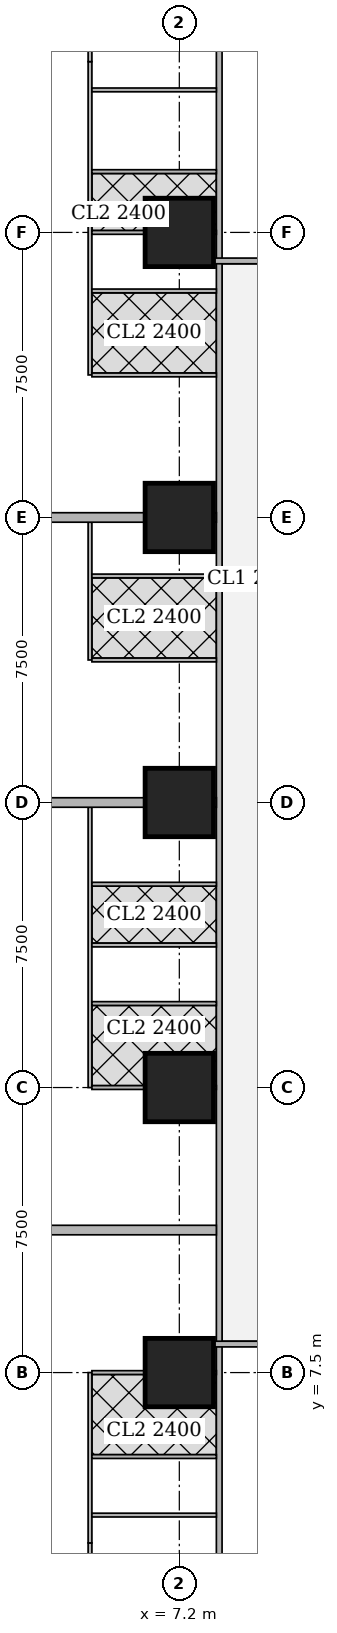
"""IFC4 building model, lengths in metres.
Left out: names, types, materials, properties, quantities, classifications, styles, units other than length and angle.
Written with IfcOpenShell. Run it as: python <this file> out.ifc"""

import sys

from ifc_helpers import new_model, si_unit, direction, frame, frame_2d, origin, origin_2d, place, context, subcontext, project, spatial, rectangle, extrude, element, fill, save


model = new_model("IFC4")
c1 = context("Model", 3, precision=1e-05, world=origin(), true_north=direction((0.0, 1.0)))
c2 = subcontext(c1, "Body", "Model", "MODEL_VIEW")
j1 = project(units=[si_unit("LENGTHUNIT", "METRE"), si_unit("PLANEANGLEUNIT", "RADIAN")], contexts=[c1])
p1 = place(None, origin())
s1 = spatial("IfcSite", under=j1, at=p1, CompositionType="ELEMENT")
p2 = place(p1, origin())
s2 = spatial("IfcBuilding", under=s1, at=p2, CompositionType="ELEMENT")
p3 = place(p2, frame((0.0, 0.0, 53.75)))
s3 = spatial("IfcBuildingStorey", under=s2, at=p3, CompositionType="ELEMENT", Elevation=53.75)
for number, where, z_axis, x_axis in (
    (1, (7.2, 7.5, 0.0), (0.0, 0.0, 1.0), (1.0, 0.0, 0.0)),
    (2, (7.2, 15.0, 0.0), (0.0, 0.0, 1.0), (1.0, 0.0, 0.0)),
    (3, (7.2, 22.5, 0.0), (0.0, 0.0, 1.0), (1.0, 0.0, 0.0)),
    (4, (7.2, 30.0, 0.0), (0.0, 0.0, 1.0), (1.0, 0.0, 0.0)),
    (5, (7.2, 37.5, 0.0), (0.0, 0.0, 1.0), (1.0, 0.0, 0.0)),
):
    element("IfcColumn", number, at=place(p3, frame(where, z_axis=z_axis, x_axis=x_axis)), inside=s3, PredefinedType="COLUMN", context=c2, shape_type="SweptSolid", body=[
        extrude(rectangle(XDim=1.8, YDim=1.8, at=origin_2d()), origin(), (0.0, 0.0, 1.0), 3.75),
    ])
p4 = place(p3, frame((8.25, 2.426, 0.0), z_axis=(0.0, 0.0, 1.0), x_axis=(0.0, 1.0, 0.0)))
e6 = element("IfcWall", 6, at=p4, inside=s3, PredefinedType="SOLIDWALL", context=c2, shape_type="SweptSolid", body=[
    extrude(rectangle(XDim=40.173, YDim=0.15, at=frame_2d((20.086, 0.0))), origin(), (0.0, 0.0, 1.0), 3.5),
])
p5 = place(p4, frame((6.661, 0.0, 0.0)))
e7 = element("IfcOpeningElement", 7, at=p5, cuts=e6, PredefinedType="OPENING", context=c2, shape_type="SweptSolid", body=[
    extrude(rectangle(XDim=1.0, YDim=2.1, at=frame_2d((0.5, 1.05))), frame((0.0, 0.085, 0.0), z_axis=(0.0, -1.0, 0.0), x_axis=(1.0, 0.0, 0.0)), (0.0, 0.0, 1.0), 0.17),
])
p6 = place(p4, frame((9.986, 0.0, 0.0)))
e8 = element("IfcOpeningElement", 8, at=p6, cuts=e6, PredefinedType="OPENING", context=c2, shape_type="SweptSolid", body=[
    extrude(rectangle(XDim=1.0, YDim=2.1, at=frame_2d((0.5, 1.05))), frame((0.0, 0.085, 0.0), z_axis=(0.0, -1.0, 0.0), x_axis=(1.0, 0.0, 0.0)), (0.0, 0.0, 1.0), 0.17),
])
p7 = place(p4, frame((21.662, 0.0, 0.0)))
e9 = element("IfcOpeningElement", 9, at=p7, cuts=e6, PredefinedType="OPENING", context=c2, shape_type="SweptSolid", body=[
    extrude(rectangle(XDim=1.0, YDim=2.1, at=frame_2d((0.5, 1.05))), frame((0.0, 0.085, 0.0), z_axis=(0.0, -1.0, 0.0), x_axis=(1.0, 0.0, 0.0)), (0.0, 0.0, 1.0), 0.17),
])
p8 = place(p4, frame((29.161, 0.0, 0.0)))
e10 = element("IfcOpeningElement", 10, at=p8, cuts=e6, PredefinedType="OPENING", context=c2, shape_type="SweptSolid", body=[
    extrude(rectangle(XDim=1.0, YDim=2.1, at=frame_2d((0.5, 1.05))), frame((0.0, 0.085, 0.0), z_axis=(0.0, -1.0, 0.0), x_axis=(1.0, 0.0, 0.0)), (0.0, 0.0, 1.0), 0.17),
])
p9 = place(p3, frame((13.499, 8.25, 0.0), z_axis=(0.0, 0.0, 1.0), x_axis=(-1.0, 0.0, 0.0)))
e11 = element("IfcWall", 11, at=p9, inside=s3, PredefinedType="SOLIDWALL", context=c2, shape_type="SweptSolid", body=[
    extrude(rectangle(XDim=5.399, YDim=0.15, at=frame_2d((2.699, 0.0))), origin(), (0.0, 0.0, 1.0), 3.5),
])
p10 = place(p9, frame((1.674, 0.0, 0.0)))
e12 = element("IfcOpeningElement", 12, at=p10, cuts=e11, PredefinedType="OPENING", context=c2, shape_type="SweptSolid", body=[
    extrude(rectangle(XDim=1.0, YDim=2.1, at=frame_2d((0.5, 1.05))), frame((0.0, 0.085, 0.0), z_axis=(0.0, -1.0, 0.0), x_axis=(1.0, 0.0, 0.0)), (0.0, 0.0, 1.0), 0.17),
])
p11 = place(p3, frame((8.1, 36.75, 0.0), z_axis=(0.0, 0.0, 1.0), x_axis=(1.0, 0.0, 0.0)))
e13 = element("IfcWall", 13, at=p11, inside=s3, PredefinedType="SOLIDWALL", context=c2, shape_type="SweptSolid", body=[
    extrude(rectangle(XDim=5.399, YDim=0.15, at=frame_2d((2.699, 0.0))), origin(), (0.0, 0.0, 1.0), 3.5),
])
p12 = place(p11, frame((2.725, 0.0, 0.0)))
e14 = element("IfcOpeningElement", 14, at=p12, cuts=e13, PredefinedType="OPENING", context=c2, shape_type="SweptSolid", body=[
    extrude(rectangle(XDim=1.0, YDim=2.1, at=frame_2d((0.5, 1.05))), frame((0.0, 0.085, 0.0), z_axis=(0.0, -1.0, 0.0), x_axis=(1.0, 0.0, 0.0)), (0.0, 0.0, 1.0), 0.17),
])
p13 = place(p3, frame((4.85, 0.121, 0.0), z_axis=(0.0, 0.0, 1.0), x_axis=(0.0, 1.0, 0.0)))
e15 = element("IfcWall", 15, at=p13, inside=s3, PredefinedType="PARTITIONING", context=c2, shape_type="SweptSolid", body=[
    extrude(rectangle(XDim=2.897, YDim=0.1, at=frame_2d((1.448, 0.0))), origin(), (0.0, 0.0, 1.0), 2.05),
])
p14 = place(p3, frame((4.85, 3.018, 0.0), z_axis=(0.0, 0.0, 1.0), x_axis=(0.0, 1.0, 0.0)))
e16 = element("IfcWall", 16, at=p14, inside=s3, PredefinedType="PARTITIONING", context=c2, shape_type="SweptSolid", body=[
    extrude(rectangle(XDim=4.482, YDim=0.1, at=frame_2d((2.241, 0.0))), origin(), (0.0, 0.0, 1.0), 3.5),
])
p15 = place(p14, frame((2.927, 0.0, 0.0)))
e17 = element("IfcOpeningElement", 17, at=p15, cuts=e16, PredefinedType="OPENING", context=c2, shape_type="SweptSolid", body=[
    extrude(rectangle(XDim=0.9, YDim=2.1, at=frame_2d((0.45, 1.05))), frame((0.0, 0.06, 0.0), z_axis=(0.0, -1.0, 0.0), x_axis=(1.0, 0.0, 0.0)), (0.0, 0.0, 1.0), 0.12),
])
p16 = place(p14, frame((1.052, 0.0, 0.0)))
e18 = element("IfcOpeningElement", 18, at=p16, cuts=e16, PredefinedType="OPENING", context=c2, shape_type="SweptSolid", body=[
    extrude(rectangle(XDim=0.9, YDim=2.1, at=frame_2d((0.45, 1.05))), frame((0.0, 0.06, 0.0), z_axis=(0.0, -1.0, 0.0), x_axis=(1.0, 0.0, 0.0)), (0.0, 0.0, 1.0), 0.12),
])
p17 = place(p3, frame((4.9, 3.75, 0.0), z_axis=(0.0, 0.0, 1.0), x_axis=(1.0, 0.0, 0.0)))
e19 = element("IfcWall", 19, at=p17, inside=s3, PredefinedType="PARTITIONING", context=c2, shape_type="SweptSolid", body=[
    extrude(rectangle(XDim=3.275, YDim=0.1, at=frame_2d((1.638, 0.0))), origin(), (0.0, 0.0, 1.0), 3.5),
])
p18 = place(p3, frame((4.9, 7.5, 0.0), z_axis=(0.0, 0.0, 1.0), x_axis=(1.0, 0.0, 0.0)))
e20 = element("IfcWall", 20, at=p18, inside=s3, PredefinedType="PARTITIONING", context=c2, shape_type="SweptSolid", body=[
    extrude(rectangle(XDim=1.399, YDim=0.1, at=frame_2d((0.7, 0.0))), origin(), (0.0, 0.0, 1.0), 3.5),
])
p19 = place(p3, frame((8.101, 7.5, 0.0), z_axis=(0.0, 0.0, 1.0), x_axis=(1.0, 0.0, 0.0)))
e21 = element("IfcWall", 21, at=p19, inside=s3, PredefinedType="PARTITIONING", context=c2, shape_type="SweptSolid", body=[
    extrude(rectangle(XDim=0.074, YDim=0.1, at=frame_2d((0.037, 0.0))), origin(), (0.0, 0.0, 1.0), 3.5),
])
p20 = place(p3, frame((4.9, 5.29, 0.0), z_axis=(0.0, 0.0, 1.0), x_axis=(1.0, 0.0, 0.0)))
e22 = element("IfcWall", 22, at=p20, inside=s3, PredefinedType="PARTITIONING", context=c2, shape_type="SweptSolid", body=[
    extrude(rectangle(XDim=3.275, YDim=0.1, at=frame_2d((1.638, 0.0))), origin(), (0.0, 0.0, 1.0), 3.5),
])
p21 = place(p3, frame((4.85, 15.0, 0.0), z_axis=(0.0, 0.0, 1.0), x_axis=(0.0, 1.0, 0.0)))
e23 = element("IfcWall", 23, at=p21, inside=s3, PredefinedType="PARTITIONING", context=c2, shape_type="SweptSolid", body=[
    extrude(rectangle(XDim=7.375, YDim=0.1, at=frame_2d((3.688, 0.0))), origin(), (0.0, 0.0, 1.0), 3.5),
])
p22 = place(p21, frame((0.655, 0.0, 0.0)))
e24 = element("IfcOpeningElement", 24, at=p22, cuts=e23, PredefinedType="OPENING", context=c2, shape_type="SweptSolid", body=[
    extrude(rectangle(XDim=0.9, YDim=2.1, at=frame_2d((0.45, 1.05))), frame((0.0, 0.06, 0.0), z_axis=(0.0, -1.0, 0.0), x_axis=(1.0, 0.0, 0.0)), (0.0, 0.0, 1.0), 0.12),
])
p23 = place(p21, frame((4.1, 0.0, 0.0)))
e25 = element("IfcOpeningElement", 25, at=p23, cuts=e23, PredefinedType="OPENING", context=c2, shape_type="SweptSolid", body=[
    extrude(rectangle(XDim=0.9, YDim=2.1, at=frame_2d((0.45, 1.05))), frame((0.0, 0.06, 0.0), z_axis=(0.0, -1.0, 0.0), x_axis=(1.0, 0.0, 0.0)), (0.0, 0.0, 1.0), 0.12),
])
p24 = place(p21, frame((2.53, 0.0, 0.0)))
e26 = element("IfcOpeningElement", 26, at=p24, cuts=e23, PredefinedType="OPENING", context=c2, shape_type="SweptSolid", body=[
    extrude(rectangle(XDim=0.9, YDim=2.1, at=frame_2d((0.45, 1.05))), frame((0.0, 0.06, 0.0), z_axis=(0.0, -1.0, 0.0), x_axis=(1.0, 0.0, 0.0)), (0.0, 0.0, 1.0), 0.12),
])
p25 = place(p21, frame((5.975, 0.0, 0.0)))
e27 = element("IfcOpeningElement", 27, at=p25, cuts=e23, PredefinedType="OPENING", context=c2, shape_type="SweptSolid", body=[
    extrude(rectangle(XDim=0.9, YDim=2.1, at=frame_2d((0.45, 1.05))), frame((0.0, 0.06, 0.0), z_axis=(0.0, -1.0, 0.0), x_axis=(1.0, 0.0, 0.0)), (0.0, 0.0, 1.0), 0.12),
])
p26 = place(p3, frame((4.9, 15.0, 0.0), z_axis=(0.0, 0.0, 1.0), x_axis=(1.0, 0.0, 0.0)))
e28 = element("IfcWall", 28, at=p26, inside=s3, PredefinedType="PARTITIONING", context=c2, shape_type="SweptSolid", body=[
    extrude(rectangle(XDim=1.399, YDim=0.1, at=frame_2d((0.7, 0.0))), origin(), (0.0, 0.0, 1.0), 3.5),
])
p27 = place(p3, frame((8.101, 15.0, 0.0), z_axis=(0.0, 0.0, 1.0), x_axis=(1.0, 0.0, 0.0)))
e29 = element("IfcWall", 29, at=p27, inside=s3, PredefinedType="PARTITIONING", context=c2, shape_type="SweptSolid", body=[
    extrude(rectangle(XDim=0.074, YDim=0.1, at=frame_2d((0.037, 0.0))), origin(), (0.0, 0.0, 1.0), 3.5),
])
for number, where, z_axis, x_axis in (
    (30, (4.9, 18.75, 0.0), (0.0, 0.0, 1.0), (1.0, 0.0, 0.0)),
    (31, (4.9, 17.21, 0.0), (0.0, 0.0, 1.0), (1.0, 0.0, 0.0)),
    (32, (4.9, 20.35, 0.0), (0.0, 0.0, 1.0), (1.0, 0.0, 0.0)),
):
    element("IfcWall", number, at=place(p3, frame(where, z_axis=z_axis, x_axis=x_axis)), inside=s3, PredefinedType="PARTITIONING", context=c2, shape_type="SweptSolid", body=[
        extrude(rectangle(XDim=3.275, YDim=0.1, at=frame_2d((1.638, 0.0))), origin(), (0.0, 0.0, 1.0), 3.5),
    ])
p28 = place(p3, frame((3.65, 11.25, 0.0), z_axis=(0.0, 0.0, 1.0), x_axis=(1.0, 0.0, 0.0)))
e33 = element("IfcWall", 33, at=p28, inside=s3, PredefinedType="SOLIDWALL", context=c2, shape_type="SweptSolid", body=[
    extrude(rectangle(XDim=4.525, YDim=0.25, at=frame_2d((2.263, 0.0))), origin(), (0.0, 0.0, 1.0), 3.5),
])
p29 = place(p3, frame((4.85, 26.25, 0.0), z_axis=(0.0, 0.0, 1.0), x_axis=(0.0, 1.0, 0.0)))
e34 = element("IfcWall", 34, at=p29, inside=s3, PredefinedType="PARTITIONING", context=c2, shape_type="SweptSolid", body=[
    extrude(rectangle(XDim=3.625, YDim=0.1, at=frame_2d((1.812, 0.0))), origin(), (0.0, 0.0, 1.0), 3.5),
])
p30 = place(p29, frame((0.655, 0.0, 0.0)))
e35 = element("IfcOpeningElement", 35, at=p30, cuts=e34, PredefinedType="OPENING", context=c2, shape_type="SweptSolid", body=[
    extrude(rectangle(XDim=0.9, YDim=2.1, at=frame_2d((0.45, 1.05))), frame((0.0, 0.06, 0.0), z_axis=(0.0, -1.0, 0.0), x_axis=(1.0, 0.0, 0.0)), (0.0, 0.0, 1.0), 0.12),
])
p31 = place(p29, frame((2.53, 0.0, 0.0)))
e36 = element("IfcOpeningElement", 36, at=p31, cuts=e34, PredefinedType="OPENING", context=c2, shape_type="SweptSolid", body=[
    extrude(rectangle(XDim=0.9, YDim=2.1, at=frame_2d((0.45, 1.05))), frame((0.0, 0.06, 0.0), z_axis=(0.0, -1.0, 0.0), x_axis=(1.0, 0.0, 0.0)), (0.0, 0.0, 1.0), 0.12),
])
for number, where, z_axis, x_axis in (
    (37, (4.9, 26.25, 0.0), (0.0, 0.0, 1.0), (1.0, 0.0, 0.0)),
    (38, (4.9, 28.46, 0.0), (0.0, 0.0, 1.0), (1.0, 0.0, 0.0)),
):
    element("IfcWall", number, at=place(p3, frame(where, z_axis=z_axis, x_axis=x_axis)), inside=s3, PredefinedType="PARTITIONING", context=c2, shape_type="SweptSolid", body=[
        extrude(rectangle(XDim=3.275, YDim=0.1, at=frame_2d((1.638, 0.0))), origin(), (0.0, 0.0, 1.0), 3.5),
    ])
p32 = place(p3, frame((3.65, 22.5, 0.0), z_axis=(0.0, 0.0, 1.0), x_axis=(1.0, 0.0, 0.0)))
e39 = element("IfcWall", 39, at=p32, inside=s3, PredefinedType="SOLIDWALL", context=c2, shape_type="SweptSolid", body=[
    extrude(rectangle(XDim=2.649, YDim=0.25, at=frame_2d((1.325, 0.0))), origin(), (0.0, 0.0, 1.0), 3.5),
])
p33 = place(p3, frame((8.101, 22.5, 0.0), z_axis=(0.0, 0.0, 1.0), x_axis=(1.0, 0.0, 0.0)))
e40 = element("IfcWall", 40, at=p33, inside=s3, PredefinedType="SOLIDWALL", context=c2, shape_type="SweptSolid", body=[
    extrude(rectangle(XDim=0.074, YDim=0.25, at=frame_2d((0.037, 0.0))), origin(), (0.0, 0.0, 1.0), 3.5),
])
p34 = place(p3, frame((4.85, 33.75, 0.0), z_axis=(0.0, 0.0, 1.0), x_axis=(0.0, 1.0, 0.0)))
e41 = element("IfcWall", 41, at=p34, inside=s3, PredefinedType="PARTITIONING", context=c2, shape_type="SweptSolid", body=[
    extrude(rectangle(XDim=8.244, YDim=0.1, at=frame_2d((4.122, 0.0))), origin(), (0.0, 0.0, 1.0), 3.5),
])
p35 = place(p34, frame((0.655, 0.0, 0.0)))
e42 = element("IfcOpeningElement", 42, at=p35, cuts=e41, PredefinedType="OPENING", context=c2, shape_type="SweptSolid", body=[
    extrude(rectangle(XDim=0.9, YDim=2.1, at=frame_2d((0.45, 1.05))), frame((0.0, 0.06, 0.0), z_axis=(0.0, -1.0, 0.0), x_axis=(1.0, 0.0, 0.0)), (0.0, 0.0, 1.0), 0.12),
])
p36 = place(p34, frame((4.1, 0.0, 0.0)))
e43 = element("IfcOpeningElement", 43, at=p36, cuts=e41, PredefinedType="OPENING", context=c2, shape_type="SweptSolid", body=[
    extrude(rectangle(XDim=0.9, YDim=2.1, at=frame_2d((0.45, 1.05))), frame((0.0, 0.06, 0.0), z_axis=(0.0, -1.0, 0.0), x_axis=(1.0, 0.0, 0.0)), (0.0, 0.0, 1.0), 0.12),
])
p37 = place(p34, frame((2.53, 0.0, 0.0)))
e44 = element("IfcOpeningElement", 44, at=p37, cuts=e41, PredefinedType="OPENING", context=c2, shape_type="SweptSolid", body=[
    extrude(rectangle(XDim=0.9, YDim=2.1, at=frame_2d((0.45, 1.05))), frame((0.0, 0.06, 0.0), z_axis=(0.0, -1.0, 0.0), x_axis=(1.0, 0.0, 0.0)), (0.0, 0.0, 1.0), 0.12),
])
p38 = place(p34, frame((5.975, 0.0, 0.0)))
e45 = element("IfcOpeningElement", 45, at=p38, cuts=e41, PredefinedType="OPENING", context=c2, shape_type="SweptSolid", body=[
    extrude(rectangle(XDim=0.9, YDim=2.1, at=frame_2d((0.45, 1.05))), frame((0.0, 0.06, 0.0), z_axis=(0.0, -1.0, 0.0), x_axis=(1.0, 0.0, 0.0)), (0.0, 0.0, 1.0), 0.12),
])
p39 = place(p3, frame((4.85, 41.994, 0.0), z_axis=(0.0, 0.0, 1.0), x_axis=(0.0, 1.0, 0.0)))
e46 = element("IfcWall", 46, at=p39, inside=s3, PredefinedType="PARTITIONING", context=c2, shape_type="SweptSolid", body=[
    extrude(rectangle(XDim=2.901, YDim=0.1, at=frame_2d((1.451, 0.0))), origin(), (0.0, 0.0, 1.0), 2.05),
])
p40 = place(p3, frame((4.9, 33.75, 0.0), z_axis=(0.0, 0.0, 1.0), x_axis=(1.0, 0.0, 0.0)))
e47 = element("IfcWall", 47, at=p40, inside=s3, PredefinedType="PARTITIONING", context=c2, shape_type="SweptSolid", body=[
    extrude(rectangle(XDim=3.275, YDim=0.1, at=frame_2d((1.638, 0.0))), origin(), (0.0, 0.0, 1.0), 3.5),
])
p41 = place(p3, frame((4.9, 37.5, 0.0), z_axis=(0.0, 0.0, 1.0), x_axis=(1.0, 0.0, 0.0)))
e48 = element("IfcWall", 48, at=p41, inside=s3, PredefinedType="PARTITIONING", context=c2, shape_type="SweptSolid", body=[
    extrude(rectangle(XDim=1.399, YDim=0.1, at=frame_2d((0.7, 0.0))), origin(), (0.0, 0.0, 1.0), 3.5),
])
p42 = place(p3, frame((8.101, 37.5, 0.0), z_axis=(0.0, 0.0, 1.0), x_axis=(1.0, 0.0, 0.0)))
e49 = element("IfcWall", 49, at=p42, inside=s3, PredefinedType="PARTITIONING", context=c2, shape_type="SweptSolid", body=[
    extrude(rectangle(XDim=0.074, YDim=0.1, at=frame_2d((0.037, 0.0))), origin(), (0.0, 0.0, 1.0), 3.5),
])
for number, where, z_axis, x_axis in (
    (50, (4.9, 41.25, 0.0), (0.0, 0.0, 1.0), (1.0, 0.0, 0.0)),
    (51, (4.9, 35.96, 0.0), (0.0, 0.0, 1.0), (1.0, 0.0, 0.0)),
    (52, (4.9, 39.1, 0.0), (0.0, 0.0, 1.0), (1.0, 0.0, 0.0)),
):
    element("IfcWall", number, at=place(p3, frame(where, z_axis=z_axis, x_axis=x_axis)), inside=s3, PredefinedType="PARTITIONING", context=c2, shape_type="SweptSolid", body=[
        extrude(rectangle(XDim=3.275, YDim=0.1, at=frame_2d((1.638, 0.0))), origin(), (0.0, 0.0, 1.0), 3.5),
    ])
p43 = place(p3, frame((3.65, 30.0, 0.0), z_axis=(0.0, 0.0, 1.0), x_axis=(1.0, 0.0, 0.0)))
e53 = element("IfcWall", 53, at=p43, inside=s3, PredefinedType="SOLIDWALL", context=c2, shape_type="SweptSolid", body=[
    extrude(rectangle(XDim=2.649, YDim=0.25, at=frame_2d((1.325, 0.0))), origin(), (0.0, 0.0, 1.0), 3.5),
])
p44 = place(p3, frame((8.101, 30.0, 0.0), z_axis=(0.0, 0.0, 1.0), x_axis=(1.0, 0.0, 0.0)))
e54 = element("IfcWall", 54, at=p44, inside=s3, PredefinedType="SOLIDWALL", context=c2, shape_type="SweptSolid", body=[
    extrude(rectangle(XDim=0.074, YDim=0.25, at=frame_2d((0.037, 0.0))), origin(), (0.0, 0.0, 1.0), 3.5),
])
p45 = place(p15, origin())
e55 = element("IfcDoor", 55, at=p45, inside=s3, OperationType="SINGLE_SWING_LEFT", PredefinedType="DOOR", context=c2, shape_type="SweptSolid", body=[
    extrude(rectangle(XDim=0.9, YDim=2.1, at=frame_2d((0.45, 1.05))), frame((0.0, 0.025, 0.0), z_axis=(0.0, -1.0, 0.0), x_axis=(1.0, 0.0, 0.0)), (0.0, 0.0, 1.0), 0.05),
])
fill(e17, e55)
p46 = place(p16, origin())
e56 = element("IfcDoor", 56, at=p46, inside=s3, OperationType="SINGLE_SWING_RIGHT", PredefinedType="DOOR", context=c2, shape_type="SweptSolid", body=[
    extrude(rectangle(XDim=0.9, YDim=2.1, at=frame_2d((0.45, 1.05))), frame((0.0, 0.025, 0.0), z_axis=(0.0, -1.0, 0.0), x_axis=(1.0, 0.0, 0.0)), (0.0, 0.0, 1.0), 0.05),
])
fill(e18, e56)
p47 = place(p5, origin())
e57 = element("IfcDoor", 57, at=p47, inside=s3, OperationType="SINGLE_SWING_RIGHT", PredefinedType="DOOR", context=c2, shape_type="SweptSolid", body=[
    extrude(rectangle(XDim=1.0, YDim=2.1, at=frame_2d((0.5, 1.05))), frame((0.0, 0.025, 0.0), z_axis=(0.0, -1.0, 0.0), x_axis=(1.0, 0.0, 0.0)), (0.0, 0.0, 1.0), 0.05),
])
fill(e7, e57)
p48 = place(p22, origin())
e58 = element("IfcDoor", 58, at=p48, inside=s3, OperationType="SINGLE_SWING_RIGHT", PredefinedType="DOOR", context=c2, shape_type="SweptSolid", body=[
    extrude(rectangle(XDim=0.9, YDim=2.1, at=frame_2d((0.45, 1.05))), frame((0.0, 0.025, 0.0), z_axis=(0.0, -1.0, 0.0), x_axis=(1.0, 0.0, 0.0)), (0.0, 0.0, 1.0), 0.05),
])
fill(e24, e58)
p49 = place(p23, origin())
e59 = element("IfcDoor", 59, at=p49, inside=s3, OperationType="SINGLE_SWING_RIGHT", PredefinedType="DOOR", context=c2, shape_type="SweptSolid", body=[
    extrude(rectangle(XDim=0.9, YDim=2.1, at=frame_2d((0.45, 1.05))), frame((0.0, 0.025, 0.0), z_axis=(0.0, -1.0, 0.0), x_axis=(1.0, 0.0, 0.0)), (0.0, 0.0, 1.0), 0.05),
])
fill(e25, e59)
p50 = place(p24, origin())
e60 = element("IfcDoor", 60, at=p50, inside=s3, OperationType="SINGLE_SWING_RIGHT", PredefinedType="DOOR", context=c2, shape_type="SweptSolid", body=[
    extrude(rectangle(XDim=0.9, YDim=2.1, at=frame_2d((0.45, 1.05))), frame((0.0, 0.025, 0.0), z_axis=(0.0, -1.0, 0.0), x_axis=(1.0, 0.0, 0.0)), (0.0, 0.0, 1.0), 0.05),
])
fill(e26, e60)
p51 = place(p25, origin())
e61 = element("IfcDoor", 61, at=p51, inside=s3, OperationType="SINGLE_SWING_LEFT", PredefinedType="DOOR", context=c2, shape_type="SweptSolid", body=[
    extrude(rectangle(XDim=0.9, YDim=2.1, at=frame_2d((0.45, 1.05))), frame((0.0, 0.025, 0.0), z_axis=(0.0, -1.0, 0.0), x_axis=(1.0, 0.0, 0.0)), (0.0, 0.0, 1.0), 0.05),
])
fill(e27, e61)
p52 = place(p6, origin())
e62 = element("IfcDoor", 62, at=p52, inside=s3, OperationType="SINGLE_SWING_LEFT", PredefinedType="DOOR", context=c2, shape_type="SweptSolid", body=[
    extrude(rectangle(XDim=1.0, YDim=2.1, at=frame_2d((0.5, 1.05))), frame((0.0, 0.025, 0.0), z_axis=(0.0, -1.0, 0.0), x_axis=(1.0, 0.0, 0.0)), (0.0, 0.0, 1.0), 0.05),
])
fill(e8, e62)
p53 = place(p30, origin())
e63 = element("IfcDoor", 63, at=p53, inside=s3, OperationType="SINGLE_SWING_RIGHT", PredefinedType="DOOR", context=c2, shape_type="SweptSolid", body=[
    extrude(rectangle(XDim=0.9, YDim=2.1, at=frame_2d((0.45, 1.05))), frame((0.0, 0.025, 0.0), z_axis=(0.0, -1.0, 0.0), x_axis=(1.0, 0.0, 0.0)), (0.0, 0.0, 1.0), 0.05),
])
fill(e35, e63)
p54 = place(p31, origin())
e64 = element("IfcDoor", 64, at=p54, inside=s3, OperationType="SINGLE_SWING_LEFT", PredefinedType="DOOR", context=c2, shape_type="SweptSolid", body=[
    extrude(rectangle(XDim=0.9, YDim=2.1, at=frame_2d((0.45, 1.05))), frame((0.0, 0.025, 0.0), z_axis=(0.0, -1.0, 0.0), x_axis=(1.0, 0.0, 0.0)), (0.0, 0.0, 1.0), 0.05),
])
fill(e36, e64)
p55 = place(p7, origin())
e65 = element("IfcDoor", 65, at=p55, inside=s3, OperationType="SINGLE_SWING_RIGHT", PredefinedType="DOOR", context=c2, shape_type="SweptSolid", body=[
    extrude(rectangle(XDim=1.0, YDim=2.1, at=frame_2d((0.5, 1.05))), frame((0.0, 0.025, 0.0), z_axis=(0.0, -1.0, 0.0), x_axis=(1.0, 0.0, 0.0)), (0.0, 0.0, 1.0), 0.05),
])
fill(e9, e65)
p56 = place(p35, origin())
e66 = element("IfcDoor", 66, at=p56, inside=s3, OperationType="SINGLE_SWING_RIGHT", PredefinedType="DOOR", context=c2, shape_type="SweptSolid", body=[
    extrude(rectangle(XDim=0.9, YDim=2.1, at=frame_2d((0.45, 1.05))), frame((0.0, 0.025, 0.0), z_axis=(0.0, -1.0, 0.0), x_axis=(1.0, 0.0, 0.0)), (0.0, 0.0, 1.0), 0.05),
])
fill(e42, e66)
p57 = place(p36, origin())
e67 = element("IfcDoor", 67, at=p57, inside=s3, OperationType="SINGLE_SWING_RIGHT", PredefinedType="DOOR", context=c2, shape_type="SweptSolid", body=[
    extrude(rectangle(XDim=0.9, YDim=2.1, at=frame_2d((0.45, 1.05))), frame((0.0, 0.025, 0.0), z_axis=(0.0, -1.0, 0.0), x_axis=(1.0, 0.0, 0.0)), (0.0, 0.0, 1.0), 0.05),
])
fill(e43, e67)
p58 = place(p37, origin())
e68 = element("IfcDoor", 68, at=p58, inside=s3, OperationType="SINGLE_SWING_RIGHT", PredefinedType="DOOR", context=c2, shape_type="SweptSolid", body=[
    extrude(rectangle(XDim=0.9, YDim=2.1, at=frame_2d((0.45, 1.05))), frame((0.0, 0.025, 0.0), z_axis=(0.0, -1.0, 0.0), x_axis=(1.0, 0.0, 0.0)), (0.0, 0.0, 1.0), 0.05),
])
fill(e44, e68)
p59 = place(p38, origin())
e69 = element("IfcDoor", 69, at=p59, inside=s3, OperationType="SINGLE_SWING_LEFT", PredefinedType="DOOR", context=c2, shape_type="SweptSolid", body=[
    extrude(rectangle(XDim=0.9, YDim=2.1, at=frame_2d((0.45, 1.05))), frame((0.0, 0.025, 0.0), z_axis=(0.0, -1.0, 0.0), x_axis=(1.0, 0.0, 0.0)), (0.0, 0.0, 1.0), 0.05),
])
fill(e45, e69)
p60 = place(p8, origin())
e70 = element("IfcDoor", 70, at=p60, inside=s3, OperationType="SINGLE_SWING_RIGHT", PredefinedType="DOOR", context=c2, shape_type="SweptSolid", body=[
    extrude(rectangle(XDim=1.0, YDim=2.1, at=frame_2d((0.5, 1.05))), frame((0.0, 0.025, 0.0), z_axis=(0.0, -1.0, 0.0), x_axis=(1.0, 0.0, 0.0)), (0.0, 0.0, 1.0), 0.05),
])
fill(e10, e70)
save(model, sys.argv[1])
